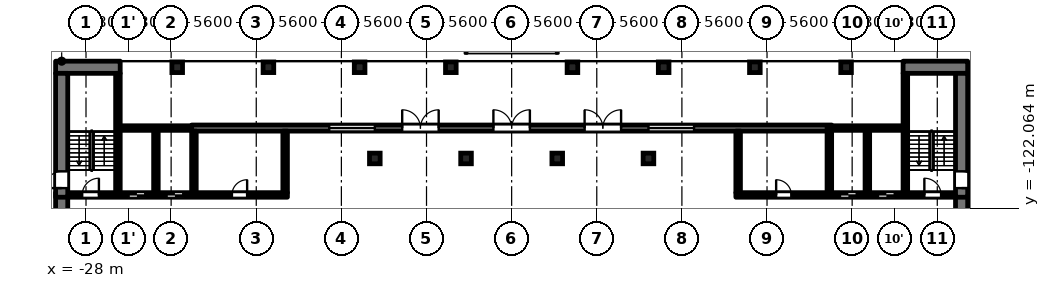
"""IFC4 building model, lengths in metres.
Left out: names, types, materials, properties, quantities, classifications, styles, units other than length and angle.
Written with IfcOpenShell. Run it as: python <this file> out.ifc"""

import sys

from ifc_helpers import new_model, si_unit, direction, frame, frame_2d, origin, origin_2d, place, context, subcontext, project, spatial, rectangle, extrude, element, fill, save


model = new_model("IFC4")
c1 = context("Model", 3, precision=1e-05, world=origin(), true_north=direction((0.0, 1.0)))
c2 = subcontext(c1, "Body", "Model", "MODEL_VIEW")
j1 = project(units=[si_unit("LENGTHUNIT", "METRE"), si_unit("PLANEANGLEUNIT", "RADIAN")], contexts=[c1])
p1 = place(None, origin())
s1 = spatial("IfcSite", under=j1, at=p1, CompositionType="ELEMENT")
p2 = place(p1, origin())
s2 = spatial("IfcBuilding", under=s1, at=p2, CompositionType="ELEMENT")
p3 = place(p2, origin())
s3 = spatial("IfcBuildingStorey", under=s2, at=p3, CompositionType="ELEMENT", Elevation=0.0)
for number, where, z_axis, x_axis in (
    (1, (-9.0, -118.8, 0.0), (0.0, 0.0, 1.0), (1.0, 0.0, 0.0)),
    (2, (-3.0, -118.8, 0.0), (0.0, 0.0, 1.0), (1.0, 0.0, 0.0)),
    (3, (3.0, -118.8, 0.0), (0.0, 0.0, 1.0), (1.0, 0.0, 0.0)),
    (4, (9.0, -118.8, 0.0), (0.0, 0.0, 1.0), (1.0, 0.0, 0.0)),
    (5, (-22.0, -112.8, 0.0), (0.0, 0.0, 1.0), (1.0, 0.0, 0.0)),
    (6, (-16.0, -112.8, 0.0), (0.0, 0.0, 1.0), (1.0, 0.0, 0.0)),
    (7, (-10.0, -112.8, 0.0), (0.0, 0.0, 1.0), (1.0, 0.0, 0.0)),
    (8, (-4.0, -112.8, 0.0), (0.0, 0.0, 1.0), (1.0, 0.0, 0.0)),
    (9, (4.0, -112.8, 0.0), (0.0, 0.0, 1.0), (1.0, 0.0, 0.0)),
    (10, (10.0, -112.8, 0.0), (0.0, 0.0, 1.0), (1.0, 0.0, 0.0)),
    (11, (16.0, -112.8, 0.0), (0.0, 0.0, 1.0), (1.0, 0.0, 0.0)),
    (12, (22.0, -112.8, 0.0), (0.0, 0.0, 1.0), (1.0, 0.0, 0.0)),
):
    element("IfcColumn", number, at=place(p3, frame(where, z_axis=z_axis, x_axis=x_axis)), inside=s3, PredefinedType="COLUMN", context=c2, shape_type="SweptSolid", body=[
        extrude(rectangle(XDim=0.7, YDim=0.7, at=origin_2d()), origin(), (0.0, 0.0, 1.0), 6.15),
    ])
p4 = place(p3, frame((-29.2, -121.2, 0.0), z_axis=(0.0, 0.0, 1.0), x_axis=(1.0, 0.0, 0.0)))
e13 = element("IfcWall", 13, at=p4, inside=s3, PredefinedType="SOLIDWALL", context=c2, shape_type="SweptSolid", body=[
    extrude(rectangle(XDim=14.45, YDim=0.3, at=frame_2d((7.225, 0.0))), origin(), (0.0, 0.0, 1.0), 6.15),
])
p5 = place(p4, frame((4.0, 0.0, 0.0)))
e14 = element("IfcOpeningElement", 14, at=p5, cuts=e13, PredefinedType="OPENING", context=c2, shape_type="SweptSolid", body=[
    extrude(rectangle(XDim=1.1, YDim=2.1, at=frame_2d((0.55, 1.05))), frame((0.0, 0.16, 0.0), z_axis=(0.0, -1.0, 0.0), x_axis=(1.0, 0.0, 0.0)), (0.0, 0.0, 1.0), 0.32),
])
p6 = place(p4, frame((6.5, 0.0, 0.0)))
e15 = element("IfcOpeningElement", 15, at=p6, cuts=e13, PredefinedType="OPENING", context=c2, shape_type="SweptSolid", body=[
    extrude(rectangle(XDim=1.1, YDim=2.1, at=frame_2d((0.55, 1.05))), frame((0.0, 0.16, 0.0), z_axis=(0.0, -1.0, 0.0), x_axis=(1.0, 0.0, 0.0)), (0.0, 0.0, 1.0), 0.32),
])
p7 = place(p4, frame((0.95, 0.0, 0.0)))
e16 = element("IfcOpeningElement", 16, at=p7, cuts=e13, PredefinedType="OPENING", context=c2, shape_type="SweptSolid", body=[
    extrude(rectangle(XDim=1.1, YDim=2.1, at=frame_2d((0.55, 1.05))), frame((0.0, 0.16, 0.0), z_axis=(0.0, -1.0, 0.0), x_axis=(1.0, 0.0, 0.0)), (0.0, 0.0, 1.0), 0.32),
])
p8 = place(p4, frame((10.8, 0.0, 0.0)))
e17 = element("IfcOpeningElement", 17, at=p8, cuts=e13, PredefinedType="OPENING", context=c2, shape_type="SweptSolid", body=[
    extrude(rectangle(XDim=1.0, YDim=2.1, at=frame_2d((0.5, 1.05))), frame((0.0, 0.16, 0.0), z_axis=(0.0, -1.0, 0.0), x_axis=(1.0, 0.0, 0.0)), (0.0, 0.0, 1.0), 0.32),
])
p9 = place(p3, frame((14.75, -121.2, 0.0), z_axis=(0.0, 0.0, 1.0), x_axis=(1.0, 0.0, 0.0)))
e18 = element("IfcWall", 18, at=p9, inside=s3, PredefinedType="SOLIDWALL", context=c2, shape_type="SweptSolid", body=[
    extrude(rectangle(XDim=14.45, YDim=0.3, at=frame_2d((7.225, 0.0))), origin(), (0.0, 0.0, 1.0), 6.15),
])
p10 = place(p9, frame((6.85, 0.0, 0.0)))
e19 = element("IfcOpeningElement", 19, at=p10, cuts=e18, PredefinedType="OPENING", context=c2, shape_type="SweptSolid", body=[
    extrude(rectangle(XDim=1.1, YDim=2.1, at=frame_2d((0.55, 1.05))), frame((0.0, 0.16, 0.0), z_axis=(0.0, -1.0, 0.0), x_axis=(1.0, 0.0, 0.0)), (0.0, 0.0, 1.0), 0.32),
])
p11 = place(p9, frame((9.35, 0.0, 0.0)))
e20 = element("IfcOpeningElement", 20, at=p11, cuts=e18, PredefinedType="OPENING", context=c2, shape_type="SweptSolid", body=[
    extrude(rectangle(XDim=1.1, YDim=2.1, at=frame_2d((0.55, 1.05))), frame((0.0, 0.16, 0.0), z_axis=(0.0, -1.0, 0.0), x_axis=(1.0, 0.0, 0.0)), (0.0, 0.0, 1.0), 0.32),
])
p12 = place(p9, frame((12.4, 0.0, 0.0)))
e21 = element("IfcOpeningElement", 21, at=p12, cuts=e18, PredefinedType="OPENING", context=c2, shape_type="SweptSolid", body=[
    extrude(rectangle(XDim=1.1, YDim=2.1, at=frame_2d((0.55, 1.05))), frame((0.0, 0.16, 0.0), z_axis=(0.0, -1.0, 0.0), x_axis=(1.0, 0.0, 0.0)), (0.0, 0.0, 1.0), 0.32),
])
p13 = place(p9, frame((2.65, 0.0, 0.0)))
e22 = element("IfcOpeningElement", 22, at=p13, cuts=e18, PredefinedType="OPENING", context=c2, shape_type="SweptSolid", body=[
    extrude(rectangle(XDim=1.0, YDim=2.1, at=frame_2d((0.5, 1.05))), frame((0.0, 0.16, 0.0), z_axis=(0.0, -1.0, 0.0), x_axis=(1.0, 0.0, 0.0)), (0.0, 0.0, 1.0), 0.32),
])
p14 = place(p3, frame((-25.75, -116.8, 0.0), z_axis=(0.0, 0.0, 1.0), x_axis=(1.0, 0.0, 0.0)))
e23 = element("IfcWall", 23, at=p14, inside=s3, PredefinedType="SOLIDWALL", context=c2, shape_type="SweptSolid", body=[
    extrude(rectangle(XDim=5.0, YDim=0.3, at=frame_2d((2.5, 0.0))), origin(), (0.0, 0.0, 1.0), 6.15),
])
p15 = place(p3, frame((-21.05, -116.8, 0.0), z_axis=(0.0, 0.0, 1.0), x_axis=(1.0, 0.0, 0.0)))
e24 = element("IfcWall", 24, at=p15, inside=s3, PredefinedType="SOLIDWALL", context=c2, shape_type="SweptSolid", body=[
    extrude(rectangle(XDim=42.1, YDim=0.4, at=frame_2d((21.05, 0.0))), origin(), (0.0, 0.0, 1.0), 6.15),
])
p16 = place(p15, frame((13.85, 0.0, 0.0)))
e25 = element("IfcOpeningElement", 25, at=p16, cuts=e24, PredefinedType="OPENING", context=c2, shape_type="SweptSolid", body=[
    extrude(rectangle(XDim=2.4, YDim=2.4, at=frame_2d((1.2, 1.2))), frame((0.0, 0.21, 0.0), z_axis=(0.0, -1.0, 0.0), x_axis=(1.0, 0.0, 0.0)), (0.0, 0.0, 1.0), 0.42),
])
p17 = place(p15, frame((19.85, 0.0, 0.0)))
e26 = element("IfcOpeningElement", 26, at=p17, cuts=e24, PredefinedType="OPENING", context=c2, shape_type="SweptSolid", body=[
    extrude(rectangle(XDim=2.4, YDim=2.4, at=frame_2d((1.2, 1.2))), frame((0.0, 0.21, 0.0), z_axis=(0.0, -1.0, 0.0), x_axis=(1.0, 0.0, 0.0)), (0.0, 0.0, 1.0), 0.42),
])
p18 = place(p15, frame((25.85, 0.0, 0.0)))
e27 = element("IfcOpeningElement", 27, at=p18, cuts=e24, PredefinedType="OPENING", context=c2, shape_type="SweptSolid", body=[
    extrude(rectangle(XDim=2.4, YDim=2.4, at=frame_2d((1.2, 1.2))), frame((0.0, 0.21, 0.0), z_axis=(0.0, -1.0, 0.0), x_axis=(1.0, 0.0, 0.0)), (0.0, 0.0, 1.0), 0.42),
])
p19 = place(p15, frame((9.05, 0.0, 0.4)))
e28 = element("IfcOpeningElement", 28, at=p19, cuts=e24, PredefinedType="OPENING", context=c2, shape_type="SweptSolid", body=[
    extrude(rectangle(XDim=3.0, YDim=4.4, at=frame_2d((1.5, 2.2))), frame((0.0, 0.21, 0.0), z_axis=(0.0, -1.0, 0.0), x_axis=(1.0, 0.0, 0.0)), (0.0, 0.0, 1.0), 0.42),
])
p20 = place(p15, frame((30.05, 0.0, 0.4)))
e29 = element("IfcOpeningElement", 29, at=p20, cuts=e24, PredefinedType="OPENING", context=c2, shape_type="SweptSolid", body=[
    extrude(rectangle(XDim=3.0, YDim=4.4, at=frame_2d((1.5, 2.2))), frame((0.0, 0.21, 0.0), z_axis=(0.0, -1.0, 0.0), x_axis=(1.0, 0.0, 0.0)), (0.0, 0.0, 1.0), 0.42),
])
p21 = place(p3, frame((20.75, -116.8, 0.0), z_axis=(0.0, 0.0, 1.0), x_axis=(1.0, 0.0, 0.0)))
e30 = element("IfcWall", 30, at=p21, inside=s3, PredefinedType="SOLIDWALL", context=c2, shape_type="SweptSolid", body=[
    extrude(rectangle(XDim=5.0, YDim=0.3, at=frame_2d((2.5, 0.0))), origin(), (0.0, 0.0, 1.0), 6.15),
])
for number, where, z_axis, x_axis in (
    (31, (-30.0, -112.8, 0.0), (0.0, 0.0, 1.0), (1.0, 0.0, 0.0)),
    (32, (25.75, -112.8, 0.0), (0.0, 0.0, 1.0), (1.0, 0.0, 0.0)),
):
    element("IfcWall", number, at=place(p3, frame(where, z_axis=z_axis, x_axis=x_axis)), inside=s3, PredefinedType="SOLIDWALL", context=c2, shape_type="SweptSolid", body=[
        extrude(rectangle(XDim=4.25, YDim=0.8, at=frame_2d((2.125, 0.0))), origin(), (0.0, 0.0, 1.0), 6.15),
    ])
p22 = place(p3, frame((-29.6, -124.925, 0.0), z_axis=(0.0, 0.0, 1.0), x_axis=(0.0, 1.0, 0.0)))
e33 = element("IfcWall", 33, at=p22, inside=s3, PredefinedType="SOLIDWALL", context=c2, shape_type="SweptSolid", body=[
    extrude(rectangle(XDim=3.875, YDim=0.8, at=frame_2d((1.938, 0.0))), origin(), (0.0, 0.0, 1.0), 6.15),
])
p23 = place(p3, frame((-29.6, -121.35, 0.0), z_axis=(0.0, 0.0, 1.0), x_axis=(0.0, 1.0, 0.0)))
e34 = element("IfcWall", 34, at=p23, inside=s3, PredefinedType="SOLIDWALL", context=c2, shape_type="SweptSolid", body=[
    extrude(rectangle(XDim=8.15, YDim=0.8, at=frame_2d((4.075, 0.0))), origin(), (0.0, 0.0, 1.0), 6.15),
])
p24 = place(p23, frame((0.6, 0.0, 0.0)))
e35 = element("IfcOpeningElement", 35, at=p24, cuts=e34, PredefinedType="OPENING", context=c2, shape_type="SweptSolid", body=[
    extrude(rectangle(XDim=1.1, YDim=2.1, at=frame_2d((0.55, 1.05))), frame((0.0, 0.41, 0.0), z_axis=(0.0, -1.0, 0.0), x_axis=(1.0, 0.0, 0.0)), (0.0, 0.0, 1.0), 0.82),
])
p25 = place(p3, frame((-25.9, -121.05, 0.0), z_axis=(0.0, 0.0, 1.0), x_axis=(0.0, 1.0, 0.0)))
e36 = element("IfcWall", 36, at=p25, inside=s3, PredefinedType="SOLIDWALL", context=c2, shape_type="SweptSolid", body=[
    extrude(rectangle(XDim=7.85, YDim=0.3, at=frame_2d((3.925, 0.0))), origin(), (0.0, 0.0, 1.0), 6.15),
])
p26 = place(p3, frame((-23.4, -121.05, 0.0), z_axis=(0.0, 0.0, 1.0), x_axis=(0.0, 1.0, 0.0)))
e37 = element("IfcWall", 37, at=p26, inside=s3, PredefinedType="SOLIDWALL", context=c2, shape_type="SweptSolid", body=[
    extrude(rectangle(XDim=4.1, YDim=0.3, at=frame_2d((2.05, 0.0))), origin(), (0.0, 0.0, 1.0), 6.15),
])
for number, where, z_axis, x_axis in (
    (38, (-20.9, -121.05, 0.0), (0.0, 0.0, 1.0), (0.0, 1.0, 0.0)),
    (39, (-14.9, -121.05, 0.0), (0.0, 0.0, 1.0), (0.0, 1.0, 0.0)),
    (40, (14.9, -121.05, 0.0), (0.0, 0.0, 1.0), (0.0, 1.0, 0.0)),
    (41, (20.9, -121.05, 0.0), (0.0, 0.0, 1.0), (0.0, 1.0, 0.0)),
):
    element("IfcWall", number, at=place(p3, frame(where, z_axis=z_axis, x_axis=x_axis)), inside=s3, PredefinedType="SOLIDWALL", context=c2, shape_type="SweptSolid", body=[
        extrude(rectangle(XDim=4.05, YDim=0.3, at=frame_2d((2.025, 0.0))), origin(), (0.0, 0.0, 1.0), 6.15),
    ])
p27 = place(p3, frame((23.4, -121.05, 0.0), z_axis=(0.0, 0.0, 1.0), x_axis=(0.0, 1.0, 0.0)))
e42 = element("IfcWall", 42, at=p27, inside=s3, PredefinedType="SOLIDWALL", context=c2, shape_type="SweptSolid", body=[
    extrude(rectangle(XDim=4.1, YDim=0.3, at=frame_2d((2.05, 0.0))), origin(), (0.0, 0.0, 1.0), 6.15),
])
p28 = place(p3, frame((25.9, -121.05, 0.0), z_axis=(0.0, 0.0, 1.0), x_axis=(0.0, 1.0, 0.0)))
e43 = element("IfcWall", 43, at=p28, inside=s3, PredefinedType="SOLIDWALL", context=c2, shape_type="SweptSolid", body=[
    extrude(rectangle(XDim=7.85, YDim=0.3, at=frame_2d((3.925, 0.0))), origin(), (0.0, 0.0, 1.0), 6.15),
])
p29 = place(p3, frame((29.6, -121.05, 0.0), z_axis=(0.0, 0.0, 1.0), x_axis=(0.0, -1.0, 0.0)))
e44 = element("IfcWall", 44, at=p29, inside=s3, PredefinedType="SOLIDWALL", context=c2, shape_type="SweptSolid", body=[
    extrude(rectangle(XDim=3.875, YDim=0.8, at=frame_2d((1.938, 0.0))), origin(), (0.0, 0.0, 1.0), 6.15),
])
p30 = place(p3, frame((29.6, -113.2, 0.0), z_axis=(0.0, 0.0, 1.0), x_axis=(0.0, -1.0, 0.0)))
e45 = element("IfcWall", 45, at=p30, inside=s3, PredefinedType="SOLIDWALL", context=c2, shape_type="SweptSolid", body=[
    extrude(rectangle(XDim=8.15, YDim=0.8, at=frame_2d((4.075, 0.0))), origin(), (0.0, 0.0, 1.0), 6.15),
])
p31 = place(p30, frame((6.45, 0.0, 0.0)))
e46 = element("IfcOpeningElement", 46, at=p31, cuts=e45, PredefinedType="OPENING", context=c2, shape_type="SweptSolid", body=[
    extrude(rectangle(XDim=1.1, YDim=2.1, at=frame_2d((0.55, 1.05))), frame((0.0, 0.41, 0.0), z_axis=(0.0, -1.0, 0.0), x_axis=(1.0, 0.0, 0.0)), (0.0, 0.0, 1.0), 0.82),
])
p32 = place(p16, origin())
e47 = element("IfcDoor", 47, at=p32, inside=s3, OperationType="DOUBLE_DOOR_DOUBLE_SWING", PredefinedType="DOOR", context=c2, shape_type="SweptSolid", body=[
    extrude(rectangle(XDim=2.4, YDim=2.4, at=frame_2d((1.2, 1.2))), frame((0.0, 0.025, 0.0), z_axis=(0.0, -1.0, 0.0), x_axis=(1.0, 0.0, 0.0)), (0.0, 0.0, 1.0), 0.05),
])
fill(e25, e47)
p33 = place(p17, origin())
e48 = element("IfcDoor", 48, at=p33, inside=s3, OperationType="DOUBLE_DOOR_DOUBLE_SWING", PredefinedType="DOOR", context=c2, shape_type="SweptSolid", body=[
    extrude(rectangle(XDim=2.4, YDim=2.4, at=frame_2d((1.2, 1.2))), frame((0.0, 0.025, 0.0), z_axis=(0.0, -1.0, 0.0), x_axis=(1.0, 0.0, 0.0)), (0.0, 0.0, 1.0), 0.05),
])
fill(e26, e48)
p34 = place(p18, origin())
e49 = element("IfcDoor", 49, at=p34, inside=s3, OperationType="DOUBLE_DOOR_DOUBLE_SWING", PredefinedType="DOOR", context=c2, shape_type="SweptSolid", body=[
    extrude(rectangle(XDim=2.4, YDim=2.4, at=frame_2d((1.2, 1.2))), frame((0.0, 0.025, 0.0), z_axis=(0.0, -1.0, 0.0), x_axis=(1.0, 0.0, 0.0)), (0.0, 0.0, 1.0), 0.05),
])
fill(e27, e49)
p35 = place(p24, origin())
e50 = element("IfcDoor", 50, at=p35, inside=s3, OperationType="SINGLE_SWING_LEFT", PredefinedType="DOOR", context=c2, shape_type="SweptSolid", body=[
    extrude(rectangle(XDim=1.1, YDim=2.1, at=frame_2d((0.55, 1.05))), frame((0.0, 0.025, 0.0), z_axis=(0.0, -1.0, 0.0), x_axis=(1.0, 0.0, 0.0)), (0.0, 0.0, 1.0), 0.05),
])
fill(e35, e50)
p36 = place(p31, origin())
e51 = element("IfcDoor", 51, at=p36, inside=s3, OperationType="SINGLE_SWING_RIGHT", PredefinedType="DOOR", context=c2, shape_type="SweptSolid", body=[
    extrude(rectangle(XDim=1.1, YDim=2.1, at=frame_2d((0.55, 1.05))), frame((0.0, 0.025, 0.0), z_axis=(0.0, -1.0, 0.0), x_axis=(1.0, 0.0, 0.0)), (0.0, 0.0, 1.0), 0.05),
])
fill(e46, e51)
p37 = place(p19, origin())
e52 = element("IfcWindow", 52, at=p37, inside=s3, PartitioningType="SINGLE_PANEL", PredefinedType="WINDOW", context=c2, shape_type="SweptSolid", body=[
    extrude(rectangle(XDim=3.0, YDim=4.4, at=frame_2d((1.5, 2.2))), frame((0.0, 0.03, 0.0), z_axis=(0.0, -1.0, 0.0), x_axis=(1.0, 0.0, 0.0)), (0.0, 0.0, 1.0), 0.06),
])
fill(e28, e52)
p38 = place(p20, origin())
e53 = element("IfcWindow", 53, at=p38, inside=s3, PartitioningType="SINGLE_PANEL", PredefinedType="WINDOW", context=c2, shape_type="SweptSolid", body=[
    extrude(rectangle(XDim=3.0, YDim=4.4, at=frame_2d((1.5, 2.2))), frame((0.0, 0.03, 0.0), z_axis=(0.0, -1.0, 0.0), x_axis=(1.0, 0.0, 0.0)), (0.0, 0.0, 1.0), 0.06),
])
fill(e29, e53)
p39 = place(p5, origin())
e54 = element("IfcDoor", 54, at=p39, inside=s3, OperationType="DOUBLE_DOOR_SLIDING", PredefinedType="DOOR", context=c2, shape_type="SweptSolid", body=[
    extrude(rectangle(XDim=1.1, YDim=2.1, at=frame_2d((0.55, 1.05))), frame((0.0, 0.025, 0.0), z_axis=(0.0, -1.0, 0.0), x_axis=(1.0, 0.0, 0.0)), (0.0, 0.0, 1.0), 0.05),
])
fill(e14, e54)
p40 = place(p6, origin())
e55 = element("IfcDoor", 55, at=p40, inside=s3, OperationType="DOUBLE_DOOR_SLIDING", PredefinedType="DOOR", context=c2, shape_type="SweptSolid", body=[
    extrude(rectangle(XDim=1.1, YDim=2.1, at=frame_2d((0.55, 1.05))), frame((0.0, 0.025, 0.0), z_axis=(0.0, -1.0, 0.0), x_axis=(1.0, 0.0, 0.0)), (0.0, 0.0, 1.0), 0.05),
])
fill(e15, e55)
p41 = place(p10, origin())
e56 = element("IfcDoor", 56, at=p41, inside=s3, OperationType="DOUBLE_DOOR_SLIDING", PredefinedType="DOOR", context=c2, shape_type="SweptSolid", body=[
    extrude(rectangle(XDim=1.1, YDim=2.1, at=frame_2d((0.55, 1.05))), frame((0.0, 0.025, 0.0), z_axis=(0.0, -1.0, 0.0), x_axis=(1.0, 0.0, 0.0)), (0.0, 0.0, 1.0), 0.05),
])
fill(e19, e56)
p42 = place(p11, origin())
e57 = element("IfcDoor", 57, at=p42, inside=s3, OperationType="DOUBLE_DOOR_SLIDING", PredefinedType="DOOR", context=c2, shape_type="SweptSolid", body=[
    extrude(rectangle(XDim=1.1, YDim=2.1, at=frame_2d((0.55, 1.05))), frame((0.0, 0.025, 0.0), z_axis=(0.0, -1.0, 0.0), x_axis=(1.0, 0.0, 0.0)), (0.0, 0.0, 1.0), 0.05),
])
fill(e20, e57)
p43 = place(p7, origin())
e58 = element("IfcDoor", 58, at=p43, inside=s3, OperationType="SINGLE_SWING_RIGHT", PredefinedType="DOOR", context=c2, shape_type="SweptSolid", body=[
    extrude(rectangle(XDim=1.1, YDim=2.1, at=frame_2d((0.55, 1.05))), frame((0.0, 0.025, 0.0), z_axis=(0.0, -1.0, 0.0), x_axis=(1.0, 0.0, 0.0)), (0.0, 0.0, 1.0), 0.05),
])
fill(e16, e58)
p44 = place(p12, origin())
e59 = element("IfcDoor", 59, at=p44, inside=s3, OperationType="SINGLE_SWING_LEFT", PredefinedType="DOOR", context=c2, shape_type="SweptSolid", body=[
    extrude(rectangle(XDim=1.1, YDim=2.1, at=frame_2d((0.55, 1.05))), frame((0.0, 0.025, 0.0), z_axis=(0.0, -1.0, 0.0), x_axis=(1.0, 0.0, 0.0)), (0.0, 0.0, 1.0), 0.05),
])
fill(e21, e59)
p45 = place(p8, origin())
e60 = element("IfcDoor", 60, at=p45, inside=s3, OperationType="SINGLE_SWING_RIGHT", PredefinedType="DOOR", context=c2, shape_type="SweptSolid", body=[
    extrude(rectangle(XDim=1.0, YDim=2.1, at=frame_2d((0.5, 1.05))), frame((0.0, 0.025, 0.0), z_axis=(0.0, -1.0, 0.0), x_axis=(1.0, 0.0, 0.0)), (0.0, 0.0, 1.0), 0.05),
])
fill(e17, e60)
p46 = place(p13, origin())
e61 = element("IfcDoor", 61, at=p46, inside=s3, OperationType="SINGLE_SWING_LEFT", PredefinedType="DOOR", context=c2, shape_type="SweptSolid", body=[
    extrude(rectangle(XDim=1.0, YDim=2.1, at=frame_2d((0.5, 1.05))), frame((0.0, 0.025, 0.0), z_axis=(0.0, -1.0, 0.0), x_axis=(1.0, 0.0, 0.0)), (0.0, 0.0, 1.0), 0.05),
])
fill(e22, e61)
save(model, sys.argv[1])
